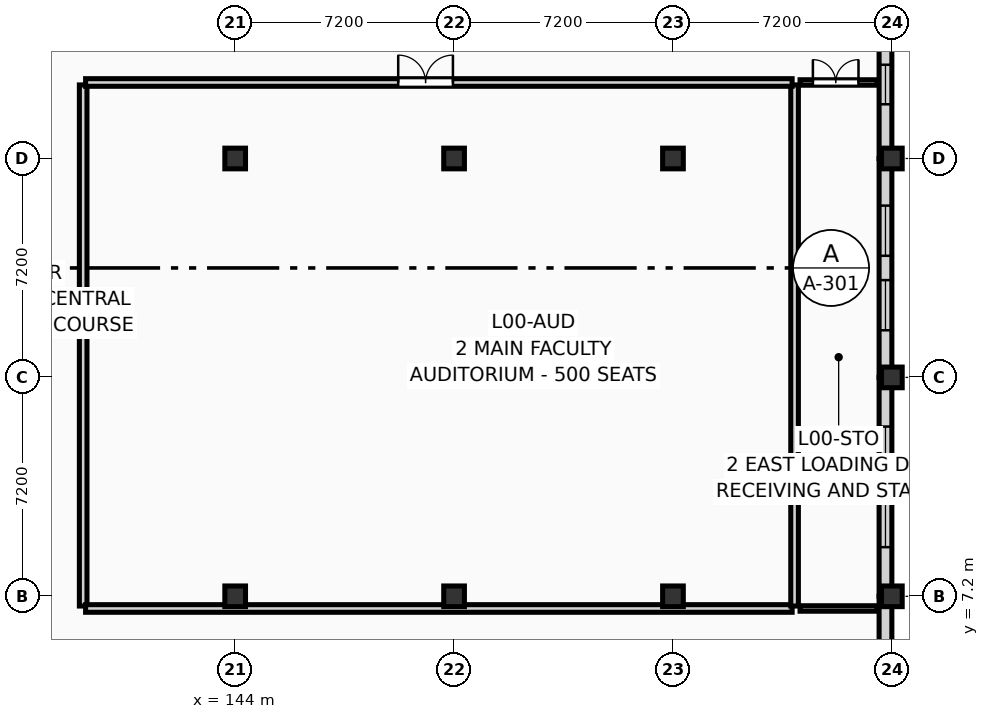
"""IFC4 building model, lengths in metres.
Left out: names, types, materials, properties, quantities, classifications, styles, units other than length and angle.
Written with IfcOpenShell. Run it as: python <this file> out.ifc"""

import sys

from ifc_helpers import new_model, si_unit, direction, frame, frame_2d, origin, origin_2d, place, context, subcontext, project, spatial, rectangle, extrude, element, fill, save


model = new_model("IFC4")
c1 = context("Model", 3, precision=1e-05, world=origin(), true_north=direction((0.0, 1.0)))
c2 = subcontext(c1, "Body", "Model", "MODEL_VIEW")
j1 = project(units=[si_unit("LENGTHUNIT", "METRE"), si_unit("PLANEANGLEUNIT", "RADIAN")], contexts=[c1])
p1 = place(None, origin())
s1 = spatial("IfcSite", under=j1, at=p1, CompositionType="ELEMENT")
p2 = place(p1, origin())
s2 = spatial("IfcBuilding", under=s1, at=p2, CompositionType="ELEMENT")
p3 = place(p2, origin())
s3 = spatial("IfcBuildingStorey", under=s2, at=p3, CompositionType="ELEMENT", Elevation=0.0)
for number, where, z_axis, x_axis in (
    (1, (144.0, 7.2, 0.0), (0.0, 0.0, 1.0), (1.0, 0.0, 0.0)),
    (2, (144.0, 21.6, 0.0), (0.0, 0.0, 1.0), (1.0, 0.0, 0.0)),
    (3, (151.2, 7.2, 0.0), (0.0, 0.0, 1.0), (1.0, 0.0, 0.0)),
    (4, (151.2, 21.6, 0.0), (0.0, 0.0, 1.0), (1.0, 0.0, 0.0)),
    (5, (158.4, 7.2, 0.0), (0.0, 0.0, 1.0), (1.0, 0.0, 0.0)),
    (6, (158.4, 21.6, 0.0), (0.0, 0.0, 1.0), (1.0, 0.0, 0.0)),
    (7, (165.6, 7.2, 0.0), (0.0, 0.0, 1.0), (1.0, 0.0, 0.0)),
    (8, (165.6, 14.4, 0.0), (0.0, 0.0, 1.0), (1.0, 0.0, 0.0)),
    (9, (165.6, 21.6, 0.0), (0.0, 0.0, 1.0), (1.0, 0.0, 0.0)),
):
    element("IfcColumn", number, at=place(p3, frame(where, z_axis=z_axis, x_axis=x_axis)), inside=s3, PredefinedType="COLUMN", context=c2, shape_type="SweptSolid", body=[
        extrude(rectangle(XDim=0.68, YDim=0.68, at=origin_2d()), origin(), (0.0, 0.0, 1.0), 4.5),
    ])
p4 = place(p3, frame((165.39, 21.6, 0.0), z_axis=(0.0, 0.0, 1.0), x_axis=(0.0, 1.0, 0.0)))
e10 = element("IfcWall", 10, at=p4, inside=s3, PredefinedType="SOLIDWALL", context=c2, shape_type="SweptSolid", body=[
    extrude(rectangle(XDim=7.2, YDim=0.42, at=frame_2d((3.6, 0.0))), origin(), (0.0, 0.0, 1.0), 3.62),
])
p5 = place(p4, frame((1.783, 0.0, 0.45)))
e11 = element("IfcOpeningElement", 11, at=p5, cuts=e10, PredefinedType="OPENING", context=c2, shape_type="SweptSolid", body=[
    extrude(rectangle(XDim=1.3, YDim=2.5, at=frame_2d((0.65, 1.25))), frame((0.0, 0.222, 0.0), z_axis=(0.0, -1.0, 0.0), x_axis=(1.0, 0.0, 0.0)), (0.0, 0.0, 1.0), 0.444),
])
p6 = place(p4, frame((4.117, 0.0, 0.45)))
e12 = element("IfcOpeningElement", 12, at=p6, cuts=e10, PredefinedType="OPENING", context=c2, shape_type="SweptSolid", body=[
    extrude(rectangle(XDim=1.3, YDim=2.5, at=frame_2d((0.65, 1.25))), frame((0.0, 0.222, 0.0), z_axis=(0.0, -1.0, 0.0), x_axis=(1.0, 0.0, 0.0)), (0.0, 0.0, 1.0), 0.444),
])
p7 = place(p3, frame((165.39, 14.4, 0.0), z_axis=(0.0, 0.0, 1.0), x_axis=(0.0, 1.0, 0.0)))
e13 = element("IfcWall", 13, at=p7, inside=s3, PredefinedType="SOLIDWALL", context=c2, shape_type="SweptSolid", body=[
    extrude(rectangle(XDim=7.2, YDim=0.42, at=frame_2d((3.6, 0.0))), origin(), (0.0, 0.0, 1.0), 3.62),
])
p8 = place(p7, frame((1.55, 0.0, 0.45)))
e14 = element("IfcOpeningElement", 14, at=p8, cuts=e13, PredefinedType="OPENING", context=c2, shape_type="SweptSolid", body=[
    extrude(rectangle(XDim=1.65, YDim=2.6, at=frame_2d((0.825, 1.3))), frame((0.0, 0.222, 0.0), z_axis=(0.0, -1.0, 0.0), x_axis=(1.0, 0.0, 0.0)), (0.0, 0.0, 1.0), 0.444),
])
p9 = place(p7, frame((4.0, 0.0, 0.45)))
e15 = element("IfcOpeningElement", 15, at=p9, cuts=e13, PredefinedType="OPENING", context=c2, shape_type="SweptSolid", body=[
    extrude(rectangle(XDim=1.65, YDim=2.6, at=frame_2d((0.825, 1.3))), frame((0.0, 0.222, 0.0), z_axis=(0.0, -1.0, 0.0), x_axis=(1.0, 0.0, 0.0)), (0.0, 0.0, 1.0), 0.444),
])
p10 = place(p3, frame((165.39, 7.2, 0.0), z_axis=(0.0, 0.0, 1.0), x_axis=(0.0, 1.0, 0.0)))
e16 = element("IfcWall", 16, at=p10, inside=s3, PredefinedType="SOLIDWALL", context=c2, shape_type="SweptSolid", body=[
    extrude(rectangle(XDim=7.2, YDim=0.42, at=frame_2d((3.6, 0.0))), origin(), (0.0, 0.0, 1.0), 3.62),
])
p11 = place(p10, frame((1.617, 0.0, 0.45)))
e17 = element("IfcOpeningElement", 17, at=p11, cuts=e16, PredefinedType="OPENING", context=c2, shape_type="SweptSolid", body=[
    extrude(rectangle(XDim=1.55, YDim=2.55, at=frame_2d((0.775, 1.275))), frame((0.0, 0.222, 0.0), z_axis=(0.0, -1.0, 0.0), x_axis=(1.0, 0.0, 0.0)), (0.0, 0.0, 1.0), 0.444),
])
p12 = place(p10, frame((4.033, 0.0, 0.45)))
e18 = element("IfcOpeningElement", 18, at=p12, cuts=e16, PredefinedType="OPENING", context=c2, shape_type="SweptSolid", body=[
    extrude(rectangle(XDim=1.55, YDim=2.55, at=frame_2d((0.775, 1.275))), frame((0.0, 0.222, 0.0), z_axis=(0.0, -1.0, 0.0), x_axis=(1.0, 0.0, 0.0)), (0.0, 0.0, 1.0), 0.444),
])
p13 = place(p3, frame((165.39, 0.0, 0.0), z_axis=(0.0, 0.0, 1.0), x_axis=(0.0, 1.0, 0.0)))
e19 = element("IfcWall", 19, at=p13, inside=s3, PredefinedType="SOLIDWALL", context=c2, shape_type="SweptSolid", body=[
    extrude(rectangle(XDim=7.2, YDim=0.42, at=frame_2d((3.6, 0.0))), origin(), (0.0, 0.0, 1.0), 3.62),
])
p14 = place(p13, frame((2.4, 0.0, 0.0)))
e20 = element("IfcOpeningElement", 20, at=p14, cuts=e19, PredefinedType="OPENING", context=c2, shape_type="SweptSolid", body=[
    extrude(rectangle(XDim=2.4, YDim=2.6, at=frame_2d((1.2, 1.3))), frame((0.0, 0.222, 0.0), z_axis=(0.0, -1.0, 0.0), x_axis=(1.0, 0.0, 0.0)), (0.0, 0.0, 1.0), 0.444),
])
p15 = place(p3, frame((139.0, 6.88, 0.0), z_axis=(0.0, 0.0, 1.0), x_axis=(0.0, 1.0, 0.0)))
e21 = element("IfcWall", 21, at=p15, inside=s3, PredefinedType="PARTITIONING", context=c2, shape_type="SweptSolid", body=[
    extrude(rectangle(XDim=17.14, YDim=0.25, at=frame_2d((8.57, 0.0))), origin(), (0.0, 0.0, 1.0), 8.185),
])
p16 = place(p3, frame((139.08, 6.8, 0.0), z_axis=(0.0, 0.0, 1.0), x_axis=(1.0, 0.0, 0.0)))
e22 = element("IfcWall", 22, at=p16, inside=s3, PredefinedType="PARTITIONING", context=c2, shape_type="SweptSolid", body=[
    extrude(rectangle(XDim=23.24, YDim=0.25, at=frame_2d((11.62, 0.0))), origin(), (0.0, 0.0, 1.0), 7.525),
])
p17 = place(p3, frame((162.4, 6.88, 0.0), z_axis=(0.0, 0.0, 1.0), x_axis=(0.0, 1.0, 0.0)))
e23 = element("IfcWall", 23, at=p17, inside=s3, PredefinedType="PARTITIONING", context=c2, shape_type="SweptSolid", body=[
    extrude(rectangle(XDim=17.14, YDim=0.25, at=frame_2d((8.57, 0.0))), origin(), (0.0, 0.0, 1.0), 8.185),
])
p18 = place(p3, frame((139.08, 24.1, 0.0), z_axis=(0.0, 0.0, 1.0), x_axis=(1.0, 0.0, 0.0)))
e24 = element("IfcWall", 24, at=p18, inside=s3, PredefinedType="PARTITIONING", context=c2, shape_type="SweptSolid", body=[
    extrude(rectangle(XDim=23.24, YDim=0.25, at=frame_2d((11.62, 0.0))), origin(), (0.0, 0.0, 1.0), 8.185),
])
p19 = place(p18, frame((10.282, 0.0, 0.0)))
e25 = element("IfcOpeningElement", 25, at=p19, cuts=e24, PredefinedType="OPENING", context=c2, shape_type="SweptSolid", body=[
    extrude(rectangle(XDim=1.8, YDim=2.3, at=frame_2d((0.9, 1.15))), frame((0.0, 0.137, 0.0), z_axis=(0.0, -1.0, 0.0), x_axis=(1.0, 0.0, 0.0)), (0.0, 0.0, 1.0), 0.274),
])
p20 = place(p3, frame((162.58, 6.8, 0.0), z_axis=(0.0, 0.0, 1.0), x_axis=(1.0, 0.0, 0.0)))
e26 = element("IfcWall", 26, at=p20, inside=s3, PredefinedType="PARTITIONING", context=c2, shape_type="SweptSolid", body=[
    extrude(rectangle(XDim=2.54, YDim=0.18, at=frame_2d((1.27, 0.0))), origin(), (0.0, 0.0, 1.0), 4.235),
])
p21 = place(p3, frame((162.58, 24.1, 0.0), z_axis=(0.0, 0.0, 1.0), x_axis=(1.0, 0.0, 0.0)))
e27 = element("IfcWall", 27, at=p21, inside=s3, PredefinedType="PARTITIONING", context=c2, shape_type="SweptSolid", body=[
    extrude(rectangle(XDim=2.54, YDim=0.18, at=frame_2d((1.27, 0.0))), origin(), (0.0, 0.0, 1.0), 4.235),
])
p22 = place(p21, frame((0.423, 0.0, 0.0)))
e28 = element("IfcOpeningElement", 28, at=p22, cuts=e27, PredefinedType="OPENING", context=c2, shape_type="SweptSolid", body=[
    extrude(rectangle(XDim=1.5, YDim=2.25, at=frame_2d((0.75, 1.125))), frame((0.0, 0.102, 0.0), z_axis=(0.0, -1.0, 0.0), x_axis=(1.0, 0.0, 0.0)), (0.0, 0.0, 1.0), 0.204),
])
p23 = place(p5, origin())
e29 = element("IfcWindow", 29, at=p23, inside=s3, PartitioningType="SINGLE_PANEL", PredefinedType="WINDOW", context=c2, shape_type="SweptSolid", body=[
    extrude(rectangle(XDim=1.3, YDim=2.5, at=frame_2d((0.65, 1.25))), frame((0.0, 0.03, 0.0), z_axis=(0.0, -1.0, 0.0), x_axis=(1.0, 0.0, 0.0)), (0.0, 0.0, 1.0), 0.06),
])
fill(e11, e29)
p24 = place(p8, origin())
e30 = element("IfcWindow", 30, at=p24, inside=s3, PartitioningType="SINGLE_PANEL", PredefinedType="WINDOW", context=c2, shape_type="SweptSolid", body=[
    extrude(rectangle(XDim=1.65, YDim=2.6, at=frame_2d((0.825, 1.3))), frame((0.0, 0.03, 0.0), z_axis=(0.0, -1.0, 0.0), x_axis=(1.0, 0.0, 0.0)), (0.0, 0.0, 1.0), 0.06),
])
fill(e14, e30)
p25 = place(p9, origin())
e31 = element("IfcWindow", 31, at=p25, inside=s3, PartitioningType="SINGLE_PANEL", PredefinedType="WINDOW", context=c2, shape_type="SweptSolid", body=[
    extrude(rectangle(XDim=1.65, YDim=2.6, at=frame_2d((0.825, 1.3))), frame((0.0, 0.03, 0.0), z_axis=(0.0, -1.0, 0.0), x_axis=(1.0, 0.0, 0.0)), (0.0, 0.0, 1.0), 0.06),
])
fill(e15, e31)
p26 = place(p11, origin())
e32 = element("IfcWindow", 32, at=p26, inside=s3, PartitioningType="SINGLE_PANEL", PredefinedType="WINDOW", context=c2, shape_type="SweptSolid", body=[
    extrude(rectangle(XDim=1.55, YDim=2.55, at=frame_2d((0.775, 1.275))), frame((0.0, 0.03, 0.0), z_axis=(0.0, -1.0, 0.0), x_axis=(1.0, 0.0, 0.0)), (0.0, 0.0, 1.0), 0.06),
])
fill(e17, e32)
p27 = place(p12, origin())
e33 = element("IfcWindow", 33, at=p27, inside=s3, PartitioningType="SINGLE_PANEL", PredefinedType="WINDOW", context=c2, shape_type="SweptSolid", body=[
    extrude(rectangle(XDim=1.55, YDim=2.55, at=frame_2d((0.775, 1.275))), frame((0.0, 0.03, 0.0), z_axis=(0.0, -1.0, 0.0), x_axis=(1.0, 0.0, 0.0)), (0.0, 0.0, 1.0), 0.06),
])
fill(e18, e33)
p28 = place(p19, origin())
e34 = element("IfcDoor", 34, at=p28, inside=s3, OperationType="DOUBLE_DOOR_SINGLE_SWING", PredefinedType="DOOR", context=c2, shape_type="SweptSolid", body=[
    extrude(rectangle(XDim=1.8, YDim=2.3, at=frame_2d((0.9, 1.15))), frame((0.0, 0.025, 0.0), z_axis=(0.0, -1.0, 0.0), x_axis=(1.0, 0.0, 0.0)), (0.0, 0.0, 1.0), 0.05),
])
fill(e25, e34)
p29 = place(p22, origin())
e35 = element("IfcDoor", 35, at=p29, inside=s3, OperationType="DOUBLE_DOOR_SINGLE_SWING", PredefinedType="DOOR", context=c2, shape_type="SweptSolid", body=[
    extrude(rectangle(XDim=1.5, YDim=2.25, at=frame_2d((0.75, 1.125))), frame((0.0, 0.025, 0.0), z_axis=(0.0, -1.0, 0.0), x_axis=(1.0, 0.0, 0.0)), (0.0, 0.0, 1.0), 0.05),
])
fill(e28, e35)
save(model, sys.argv[1])
